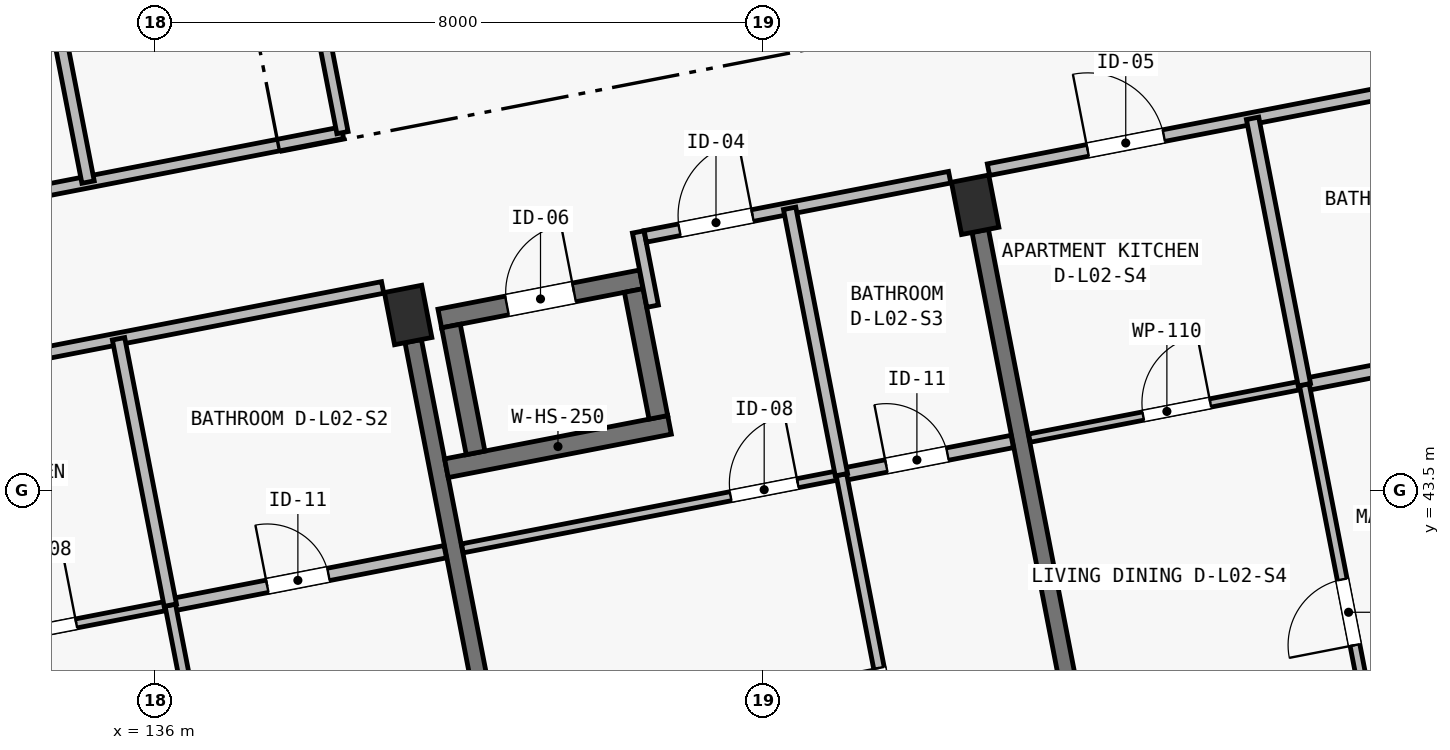
"""IFC4 building model, lengths in metres.
Left out: names, types, materials, properties, quantities, classifications, styles, units other than length and angle.
Written with IfcOpenShell. Run it as: python <this file> out.ifc"""

import sys

from ifc_helpers import new_model, si_unit, direction, frame, frame_2d, origin, origin_2d, place, context, subcontext, project, spatial, rectangle, extrude, element, fill, save


model = new_model("IFC4")
c1 = context("Model", 3, precision=1e-05, world=origin(), true_north=direction((0.0, 1.0)))
c2 = subcontext(c1, "Body", "Model", "MODEL_VIEW")
j1 = project(units=[si_unit("LENGTHUNIT", "METRE"), si_unit("PLANEANGLEUNIT", "RADIAN")], contexts=[c1])
p1 = place(None, origin())
s1 = spatial("IfcSite", under=j1, at=p1, CompositionType="ELEMENT")
p2 = place(p1, origin())
s2 = spatial("IfcBuilding", under=s1, at=p2, CompositionType="ELEMENT")
p3 = place(p2, frame((0.0, 0.0, 8.4)))
s3 = spatial("IfcBuildingStorey", under=s2, at=p3, CompositionType="ELEMENT", Elevation=8.4)
for number, where, z_axis, x_axis in (
    (1, (139.331, 45.811, 0.0), (0.0, 0.0, 1.0), (0.982, 0.191, 0.0)),
    (2, (146.791, 47.261, 0.0), (0.0, 0.0, 1.0), (0.982, 0.191, 0.0)),
):
    element("IfcColumn", number, at=place(p3, frame(where, z_axis=z_axis, x_axis=x_axis)), inside=s3, PredefinedType="COLUMN", context=c2, shape_type="SweptSolid", body=[
        extrude(rectangle(XDim=0.5, YDim=0.7, at=origin_2d()), origin(), (0.0, 0.0, 1.0), 3.25),
    ])
p4 = place(p3, frame((140.714, 38.694, 0.0), z_axis=(0.0, 0.0, 1.0), x_axis=(-0.190819465253, 0.981625148252, 0.0)))
e3 = element("IfcWall", 3, at=p4, inside=s3, PredefinedType="SHEAR", context=c2, shape_type="SweptSolid", body=[
    extrude(rectangle(XDim=6.9, YDim=0.22, at=frame_2d((3.45, 0.0))), origin(), (0.0, 0.0, 1.0), 2.5),
])
p5 = place(p3, frame((148.175, 40.144, 0.0), z_axis=(0.0, 0.0, 1.0), x_axis=(-0.190812837813, 0.981626436546, 0.0)))
e4 = element("IfcWall", 4, at=p5, inside=s3, PredefinedType="SHEAR", context=c2, shape_type="SweptSolid", body=[
    extrude(rectangle(XDim=6.9, YDim=0.22, at=frame_2d((3.45, 0.0))), origin(), (0.0, 0.0, 1.0), 2.5),
])
p6 = place(p3, frame((139.835, 43.795, 0.0), z_axis=(0.0, 0.0, 1.0), x_axis=(0.981624737535, 0.190821578075, 0.0)))
e5 = element("IfcWall", 5, at=p6, inside=s3, PredefinedType="SHEAR", context=c2, shape_type="SweptSolid", body=[
    extrude(rectangle(XDim=2.99, YDim=0.25, at=frame_2d((1.495, 0.0))), origin(), (0.0, 0.0, 1.0), 3.25),
])
p7 = place(p3, frame((139.748, 45.764, 0.0), z_axis=(0.0, 0.0, 1.0), x_axis=(0.981630445883, 0.190792210834, 0.0)))
e6 = element("IfcWall", 6, at=p7, inside=s3, PredefinedType="SHEAR", context=c2, shape_type="SweptSolid", body=[
    extrude(rectangle(XDim=2.7, YDim=0.25, at=frame_2d((1.35, 0.0))), origin(), (0.0, 0.0, 1.0), 3.25),
])
p8 = place(p7, frame((0.9, 0.0, 0.0)))
e7 = element("IfcOpeningElement", 7, at=p8, cuts=e6, PredefinedType="OPENING", context=c2, shape_type="SweptSolid", body=[
    extrude(rectangle(XDim=0.9, YDim=2.05, at=frame_2d((0.45, 1.025))), frame((0.0, 0.14, 0.0), z_axis=(0.0, -1.0, 0.0), x_axis=(1.0, 0.0, 0.0)), (0.0, 0.0, 1.0), 0.28),
])
for number, where, z_axis, x_axis in (
    (8, (140.218, 43.997, 0.0), (0.0, 0.0, 1.0), (-0.191, 0.982, 0.0)),
    (9, (142.623, 44.464, 0.0), (0.0, 0.0, 1.0), (-0.191, 0.982, 0.0)),
):
    element("IfcWall", number, at=place(p3, frame(where, z_axis=z_axis, x_axis=x_axis)), inside=s3, PredefinedType="SHEAR", context=c2, shape_type="SweptSolid", body=[
        extrude(rectangle(XDim=1.7, YDim=0.25, at=frame_2d((0.85, 0.0))), origin(), (0.0, 0.0, 1.0), 3.25),
    ])
p9 = place(p3, frame((132.046, 44.823, 0.0), z_axis=(0.0, 0.0, 1.0), x_axis=(0.9816234647, 0.190828125677, 0.0)))
e10 = element("IfcWall", 10, at=p9, inside=s3, PredefinedType="PARTITIONING", context=c2, shape_type="SweptSolid", body=[
    extrude(rectangle(XDim=7.08, YDim=0.155, at=frame_2d((3.54, 0.0))), origin(), (0.0, 0.0, 1.0), 2.97),
])
p10 = place(p9, frame((1.33, 0.0, 0.0)))
e11 = element("IfcOpeningElement", 11, at=p10, cuts=e10, PredefinedType="OPENING", context=c2, shape_type="SweptSolid", body=[
    extrude(rectangle(XDim=0.98, YDim=2.15, at=frame_2d((0.49, 1.075))), frame((0.0, 0.093, 0.0), z_axis=(0.0, -1.0, 0.0), x_axis=(1.0, 0.0, 0.0)), (0.0, 0.0, 1.0), 0.185),
])
p11 = place(p3, frame((132.584, 41.291, 0.0), z_axis=(0.0, 0.0, 1.0), x_axis=(0.981628834294, 0.190800502313, 0.0)))
e12 = element("IfcWall", 12, at=p11, inside=s3, PredefinedType="PARTITIONING", context=c2, shape_type="SweptSolid", body=[
    extrude(rectangle(XDim=3.685, YDim=0.12, at=frame_2d((1.843, 0.0))), origin(), (0.0, 0.0, 1.0), 2.97),
])
p12 = place(p11, frame((1.525, 0.0, 0.0)))
e13 = element("IfcOpeningElement", 13, at=p12, cuts=e12, PredefinedType="OPENING", context=c2, shape_type="SweptSolid", body=[
    extrude(rectangle(XDim=0.9, YDim=2.1, at=frame_2d((0.45, 1.05))), frame((0.0, 0.075, 0.0), z_axis=(0.0, -1.0, 0.0), x_axis=(1.0, 0.0, 0.0)), (0.0, 0.0, 1.0), 0.15),
])
p13 = place(p3, frame((136.202, 41.994, 0.0), z_axis=(0.0, 0.0, 1.0), x_axis=(0.981626422232, 0.190812911449, 0.0)))
e14 = element("IfcWall", 14, at=p13, inside=s3, PredefinedType="PLUMBINGWALL", context=c2, shape_type="SweptSolid", body=[
    extrude(rectangle(XDim=3.685, YDim=0.165, at=frame_2d((1.842, 0.0))), origin(), (0.0, 0.0, 1.0), 2.97),
])
p14 = place(p13, frame((1.3, 0.0, 0.0)))
e15 = element("IfcOpeningElement", 15, at=p14, cuts=e14, PredefinedType="OPENING", context=c2, shape_type="SweptSolid", body=[
    extrude(rectangle(XDim=0.82, YDim=2.08, at=frame_2d((0.41, 1.04))), frame((0.0, 0.097, 0.0), z_axis=(0.0, -1.0, 0.0), x_axis=(1.0, 0.0, 0.0)), (0.0, 0.0, 1.0), 0.195),
])
p15 = place(p3, frame((137.125, 37.242, 0.0), z_axis=(0.0, 0.0, 1.0), x_axis=(-0.190768400775, 0.981635073368, 0.0)))
e16 = element("IfcWall", 16, at=p15, inside=s3, PredefinedType="PARTITIONING", context=c2, shape_type="SweptSolid", body=[
    extrude(rectangle(XDim=4.84, YDim=0.14, at=frame_2d((2.42, 0.0))), origin(), (0.0, 0.0, 1.0), 2.97),
])
p16 = place(p15, frame((1.35, 0.0, 0.0)))
e17 = element("IfcOpeningElement", 17, at=p16, cuts=e16, PredefinedType="OPENING", context=c2, shape_type="SweptSolid", body=[
    extrude(rectangle(XDim=0.9, YDim=2.1, at=frame_2d((0.45, 1.05))), frame((0.0, 0.085, 0.0), z_axis=(0.0, -1.0, 0.0), x_axis=(1.0, 0.0, 0.0)), (0.0, 0.0, 1.0), 0.17),
])
p17 = place(p3, frame((136.202, 41.994, 0.0), z_axis=(0.0, 0.0, 1.0), x_axis=(-0.190865998276, 0.981616101489, 0.0)))
e18 = element("IfcWall", 18, at=p17, inside=s3, PredefinedType="PLUMBINGWALL", context=c2, shape_type="SweptSolid", body=[
    extrude(rectangle(XDim=3.57, YDim=0.165, at=frame_2d((1.785, 0.0))), origin(), (0.0, 0.0, 1.0), 2.97),
])
p18 = place(p3, frame((142.548, 45.927, 0.0), z_axis=(0.0, 0.0, 1.0), x_axis=(-0.190639805817, 0.981660055436, 0.0)))
e19 = element("IfcWall", 19, at=p18, inside=s3, PredefinedType="PARTITIONING", context=c2, shape_type="SweptSolid", body=[
    extrude(rectangle(XDim=0.995, YDim=0.155, at=frame_2d((0.498, 0.0))), origin(), (0.0, 0.0, 1.0), 2.97),
])
p19 = place(p3, frame((142.451, 46.845, 0.0), z_axis=(0.0, 0.0, 1.0), x_axis=(0.981636249117, 0.190762350636, 0.0)))
e20 = element("IfcWall", 20, at=p19, inside=s3, PredefinedType="PARTITIONING", context=c2, shape_type="SweptSolid", body=[
    extrude(rectangle(XDim=4.08, YDim=0.155, at=frame_2d((2.04, 0.0))), origin(), (0.0, 0.0, 1.0), 2.97),
])
p20 = place(p19, frame((0.458, 0.0, 0.0)))
e21 = element("IfcOpeningElement", 21, at=p20, cuts=e20, PredefinedType="OPENING", context=c2, shape_type="SweptSolid", body=[
    extrude(rectangle(XDim=0.98, YDim=2.15, at=frame_2d((0.49, 1.075))), frame((0.0, 0.093, 0.0), z_axis=(0.0, -1.0, 0.0), x_axis=(1.0, 0.0, 0.0)), (0.0, 0.0, 1.0), 0.185),
])
p21 = place(p3, frame((140.045, 42.741, 0.0), z_axis=(0.0, 0.0, 1.0), x_axis=(0.981629144122, 0.190798908307, 0.0)))
e22 = element("IfcWall", 22, at=p21, inside=s3, PredefinedType="PARTITIONING", context=c2, shape_type="SweptSolid", body=[
    extrude(rectangle(XDim=5.08, YDim=0.12, at=frame_2d((2.54, 0.0))), origin(), (0.0, 0.0, 1.0), 2.97),
])
p22 = place(p21, frame((3.595, 0.0, 0.0)))
e23 = element("IfcOpeningElement", 23, at=p22, cuts=e22, PredefinedType="OPENING", context=c2, shape_type="SweptSolid", body=[
    extrude(rectangle(XDim=0.9, YDim=2.1, at=frame_2d((0.45, 1.05))), frame((0.0, 0.075, 0.0), z_axis=(0.0, -1.0, 0.0), x_axis=(1.0, 0.0, 0.0)), (0.0, 0.0, 1.0), 0.15),
])
p23 = place(p3, frame((145.031, 43.71, 0.0), z_axis=(0.0, 0.0, 1.0), x_axis=(0.981624265801, 0.190824004755, 0.0)))
e24 = element("IfcWall", 24, at=p23, inside=s3, PredefinedType="PLUMBINGWALL", context=c2, shape_type="SweptSolid", body=[
    extrude(rectangle(XDim=2.29, YDim=0.165, at=frame_2d((1.145, 0.0))), origin(), (0.0, 0.0, 1.0), 2.97),
])
p24 = place(p23, frame((0.602, 0.0, 0.0)))
e25 = element("IfcOpeningElement", 25, at=p24, cuts=e24, PredefinedType="OPENING", context=c2, shape_type="SweptSolid", body=[
    extrude(rectangle(XDim=0.82, YDim=2.08, at=frame_2d((0.41, 1.04))), frame((0.0, 0.097, 0.0), z_axis=(0.0, -1.0, 0.0), x_axis=(1.0, 0.0, 0.0)), (0.0, 0.0, 1.0), 0.195),
])
p25 = place(p3, frame((145.955, 38.959, 0.0), z_axis=(0.0, 0.0, 1.0), x_axis=(-0.190826454074, 0.98162378966, 0.0)))
e26 = element("IfcWall", 26, at=p25, inside=s3, PredefinedType="PARTITIONING", context=c2, shape_type="SweptSolid", body=[
    extrude(rectangle(XDim=4.84, YDim=0.14, at=frame_2d((2.42, 0.0))), origin(), (0.0, 0.0, 1.0), 2.97),
])
p26 = place(p25, frame((1.35, 0.0, 0.0)))
e27 = element("IfcOpeningElement", 27, at=p26, cuts=e26, PredefinedType="OPENING", context=c2, shape_type="SweptSolid", body=[
    extrude(rectangle(XDim=0.9, YDim=2.1, at=frame_2d((0.45, 1.05))), frame((0.0, 0.085, 0.0), z_axis=(0.0, -1.0, 0.0), x_axis=(1.0, 0.0, 0.0)), (0.0, 0.0, 1.0), 0.17),
])
p27 = place(p3, frame((145.031, 43.71, 0.0), z_axis=(0.0, 0.0, 1.0), x_axis=(-0.190800102044, 0.981628912095, 0.0)))
e28 = element("IfcWall", 28, at=p27, inside=s3, PredefinedType="PLUMBINGWALL", context=c2, shape_type="SweptSolid", body=[
    extrude(rectangle(XDim=3.57, YDim=0.165, at=frame_2d((1.785, 0.0))), origin(), (0.0, 0.0, 1.0), 2.97),
])
p28 = place(p3, frame((146.966, 47.723, 0.0), z_axis=(0.0, 0.0, 1.0), x_axis=(0.981629923556, 0.190794898199, 0.0)))
e29 = element("IfcWall", 29, at=p28, inside=s3, PredefinedType="PARTITIONING", context=c2, shape_type="SweptSolid", body=[
    extrude(rectangle(XDim=7.08, YDim=0.155, at=frame_2d((3.54, 0.0))), origin(), (0.0, 0.0, 1.0), 2.97),
])
p29 = place(p28, frame((1.33, 0.0, 0.0)))
e30 = element("IfcOpeningElement", 30, at=p29, cuts=e29, PredefinedType="OPENING", context=c2, shape_type="SweptSolid", body=[
    extrude(rectangle(XDim=1.02, YDim=2.2, at=frame_2d((0.51, 1.1))), frame((0.0, 0.093, 0.0), z_axis=(0.0, -1.0, 0.0), x_axis=(1.0, 0.0, 0.0)), (0.0, 0.0, 1.0), 0.185),
])
p30 = place(p3, frame((147.505, 44.191, 0.0), z_axis=(0.0, 0.0, 1.0), x_axis=(0.981626422232, 0.190812911449, 0.0)))
e31 = element("IfcWall", 31, at=p30, inside=s3, PredefinedType="PARTITIONING", context=c2, shape_type="SweptSolid", body=[
    extrude(rectangle(XDim=3.685, YDim=0.11, at=frame_2d((1.842, 0.0))), origin(), (0.0, 0.0, 1.0), 2.97),
])
p31 = place(p30, frame((1.525, 0.0, 0.0)))
e32 = element("IfcOpeningElement", 32, at=p31, cuts=e31, PredefinedType="OPENING", context=c2, shape_type="SweptSolid", body=[
    extrude(rectangle(XDim=0.9, YDim=2.1, at=frame_2d((0.45, 1.05))), frame((0.0, 0.07, 0.0), z_axis=(0.0, -1.0, 0.0), x_axis=(1.0, 0.0, 0.0)), (0.0, 0.0, 1.0), 0.14),
])
p32 = place(p3, frame((151.123, 44.894, 0.0), z_axis=(0.0, 0.0, 1.0), x_axis=(0.981626422232, 0.190812911449, 0.0)))
e33 = element("IfcWall", 33, at=p32, inside=s3, PredefinedType="PLUMBINGWALL", context=c2, shape_type="SweptSolid", body=[
    extrude(rectangle(XDim=3.685, YDim=0.165, at=frame_2d((1.842, 0.0))), origin(), (0.0, 0.0, 1.0), 2.97),
])
p33 = place(p32, frame((1.3, 0.0, 0.0)))
e34 = element("IfcOpeningElement", 34, at=p33, cuts=e33, PredefinedType="OPENING", context=c2, shape_type="SweptSolid", body=[
    extrude(rectangle(XDim=0.82, YDim=2.08, at=frame_2d((0.41, 1.04))), frame((0.0, 0.097, 0.0), z_axis=(0.0, -1.0, 0.0), x_axis=(1.0, 0.0, 0.0)), (0.0, 0.0, 1.0), 0.195),
])
p34 = place(p3, frame((152.046, 40.143, 0.0), z_axis=(0.0, 0.0, 1.0), x_axis=(-0.190826454074, 0.98162378966, 0.0)))
e35 = element("IfcWall", 35, at=p34, inside=s3, PredefinedType="PARTITIONING", context=c2, shape_type="SweptSolid", body=[
    extrude(rectangle(XDim=4.84, YDim=0.13, at=frame_2d((2.42, 0.0))), origin(), (0.0, 0.0, 1.0), 2.97),
])
p35 = place(p34, frame((1.35, 0.0, 0.0)))
e36 = element("IfcOpeningElement", 36, at=p35, cuts=e35, PredefinedType="OPENING", context=c2, shape_type="SweptSolid", body=[
    extrude(rectangle(XDim=0.88, YDim=2.1, at=frame_2d((0.44, 1.05))), frame((0.0, 0.08, 0.0), z_axis=(0.0, -1.0, 0.0), x_axis=(1.0, 0.0, 0.0)), (0.0, 0.0, 1.0), 0.16),
])
p36 = place(p3, frame((151.123, 44.894, 0.0), z_axis=(0.0, 0.0, 1.0), x_axis=(-0.190787294327, 0.981631401455, 0.0)))
e37 = element("IfcWall", 37, at=p36, inside=s3, PredefinedType="PLUMBINGWALL", context=c2, shape_type="SweptSolid", body=[
    extrude(rectangle(XDim=3.57, YDim=0.165, at=frame_2d((1.785, 0.0))), origin(), (0.0, 0.0, 1.0), 2.97),
])
p37 = place(p3, frame((131.772, 46.909, 0.0), z_axis=(0.0, 0.0, 1.0), x_axis=(0.981622468528, 0.190833249935, 0.0)))
e38 = element("IfcWall", 38, at=p37, inside=s3, PredefinedType="PARTITIONING", context=c2, shape_type="SweptSolid", body=[
    extrude(rectangle(XDim=6.82, YDim=0.155, at=frame_2d((3.41, 0.0))), origin(), (0.0, 0.0, 1.0), 2.97),
])
p38 = place(p37, frame((1.205, 0.0, 0.0)))
e39 = element("IfcOpeningElement", 39, at=p38, cuts=e38, PredefinedType="OPENING", context=c2, shape_type="SweptSolid", body=[
    extrude(rectangle(XDim=1.02, YDim=2.2, at=frame_2d((0.51, 1.1))), frame((0.0, 0.093, 0.0), z_axis=(0.0, -1.0, 0.0), x_axis=(1.0, 0.0, 0.0)), (0.0, 0.0, 1.0), 0.185),
])
p39 = place(p3, frame((135.12, 47.559, 0.0), z_axis=(0.0, 0.0, 1.0), x_axis=(-0.190807031124, 0.981627565258, 0.0)))
e40 = element("IfcWall", 40, at=p39, inside=s3, PredefinedType="PLUMBINGWALL", context=c2, shape_type="SweptSolid", body=[
    extrude(rectangle(XDim=5.53, YDim=0.165, at=frame_2d((2.765, 0.0))), origin(), (0.0, 0.0, 1.0), 2.97),
])
p40 = place(p3, frame((138.467, 48.21, 0.0), z_axis=(0.0, 0.0, 1.0), x_axis=(-0.190814044018, 0.981626202078, 0.0)))
e41 = element("IfcWall", 41, at=p40, inside=s3, PredefinedType="PARTITIONING", context=c2, shape_type="SweptSolid", body=[
    extrude(rectangle(XDim=9.87, YDim=0.15, at=frame_2d((4.935, 0.0))), origin(), (0.0, 0.0, 1.0), 2.97),
])
p41 = place(p12, origin())
e42 = element("IfcDoor", 42, at=p41, inside=s3, OperationType="SINGLE_SWING_RIGHT", PredefinedType="DOOR", context=c2, shape_type="SweptSolid", body=[
    extrude(rectangle(XDim=0.9, YDim=2.1, at=frame_2d((0.45, 1.05))), frame((0.0, 0.025, 0.0), z_axis=(0.0, -1.0, 0.0), x_axis=(1.0, 0.0, 0.0)), (0.0, 0.0, 1.0), 0.05),
])
fill(e13, e42)
p42 = place(p14, origin())
e43 = element("IfcDoor", 43, at=p42, inside=s3, OperationType="SINGLE_SWING_LEFT", PredefinedType="DOOR", context=c2, shape_type="SweptSolid", body=[
    extrude(rectangle(XDim=0.82, YDim=2.08, at=frame_2d((0.41, 1.04))), frame((0.0, 0.025, 0.0), z_axis=(0.0, -1.0, 0.0), x_axis=(1.0, 0.0, 0.0)), (0.0, 0.0, 1.0), 0.05),
])
fill(e15, e43)
p43 = place(p20, origin())
e44 = element("IfcDoor", 44, at=p43, inside=s3, OperationType="SINGLE_SWING_RIGHT", PredefinedType="DOOR", context=c2, shape_type="SweptSolid", body=[
    extrude(rectangle(XDim=0.98, YDim=2.15, at=frame_2d((0.49, 1.075))), frame((0.0, 0.025, 0.0), z_axis=(0.0, -1.0, 0.0), x_axis=(1.0, 0.0, 0.0)), (0.0, 0.0, 1.0), 0.05),
])
fill(e21, e44)
p44 = place(p22, origin())
e45 = element("IfcDoor", 45, at=p44, inside=s3, OperationType="SINGLE_SWING_RIGHT", PredefinedType="DOOR", context=c2, shape_type="SweptSolid", body=[
    extrude(rectangle(XDim=0.9, YDim=2.1, at=frame_2d((0.45, 1.05))), frame((0.0, 0.025, 0.0), z_axis=(0.0, -1.0, 0.0), x_axis=(1.0, 0.0, 0.0)), (0.0, 0.0, 1.0), 0.05),
])
fill(e23, e45)
p45 = place(p24, origin())
e46 = element("IfcDoor", 46, at=p45, inside=s3, OperationType="SINGLE_SWING_LEFT", PredefinedType="DOOR", context=c2, shape_type="SweptSolid", body=[
    extrude(rectangle(XDim=0.82, YDim=2.08, at=frame_2d((0.41, 1.04))), frame((0.0, 0.025, 0.0), z_axis=(0.0, -1.0, 0.0), x_axis=(1.0, 0.0, 0.0)), (0.0, 0.0, 1.0), 0.05),
])
fill(e25, e46)
p46 = place(p26, origin())
e47 = element("IfcDoor", 47, at=p46, inside=s3, OperationType="SINGLE_SWING_RIGHT", PredefinedType="DOOR", context=c2, shape_type="SweptSolid", body=[
    extrude(rectangle(XDim=0.9, YDim=2.1, at=frame_2d((0.45, 1.05))), frame((0.0, 0.025, 0.0), z_axis=(0.0, -1.0, 0.0), x_axis=(1.0, 0.0, 0.0)), (0.0, 0.0, 1.0), 0.05),
])
fill(e27, e47)
p47 = place(p29, origin())
e48 = element("IfcDoor", 48, at=p47, inside=s3, OperationType="SINGLE_SWING_LEFT", PredefinedType="DOOR", context=c2, shape_type="SweptSolid", body=[
    extrude(rectangle(XDim=1.02, YDim=2.2, at=frame_2d((0.51, 1.1))), frame((0.0, 0.025, 0.0), z_axis=(0.0, -1.0, 0.0), x_axis=(1.0, 0.0, 0.0)), (0.0, 0.0, 1.0), 0.05),
])
fill(e30, e48)
p48 = place(p31, origin())
e49 = element("IfcDoor", 49, at=p48, inside=s3, OperationType="SINGLE_SWING_RIGHT", PredefinedType="DOOR", context=c2, shape_type="SweptSolid", body=[
    extrude(rectangle(XDim=0.9, YDim=2.1, at=frame_2d((0.45, 1.05))), frame((0.0, 0.025, 0.0), z_axis=(0.0, -1.0, 0.0), x_axis=(1.0, 0.0, 0.0)), (0.0, 0.0, 1.0), 0.05),
])
fill(e32, e49)
p49 = place(p35, origin())
e50 = element("IfcDoor", 50, at=p49, inside=s3, OperationType="SINGLE_SWING_LEFT", PredefinedType="DOOR", context=c2, shape_type="SweptSolid", body=[
    extrude(rectangle(XDim=0.88, YDim=2.1, at=frame_2d((0.44, 1.05))), frame((0.0, 0.025, 0.0), z_axis=(0.0, -1.0, 0.0), x_axis=(1.0, 0.0, 0.0)), (0.0, 0.0, 1.0), 0.05),
])
fill(e36, e50)
p50 = place(p8, origin())
e51 = element("IfcDoor", 51, at=p50, inside=s3, OperationType="SINGLE_SWING_RIGHT", PredefinedType="DOOR", context=c2, shape_type="SweptSolid", body=[
    extrude(rectangle(XDim=0.9, YDim=2.05, at=frame_2d((0.45, 1.025))), frame((0.0, 0.025, 0.0), z_axis=(0.0, -1.0, 0.0), x_axis=(1.0, 0.0, 0.0)), (0.0, 0.0, 1.0), 0.05),
])
fill(e7, e51)
save(model, sys.argv[1])
